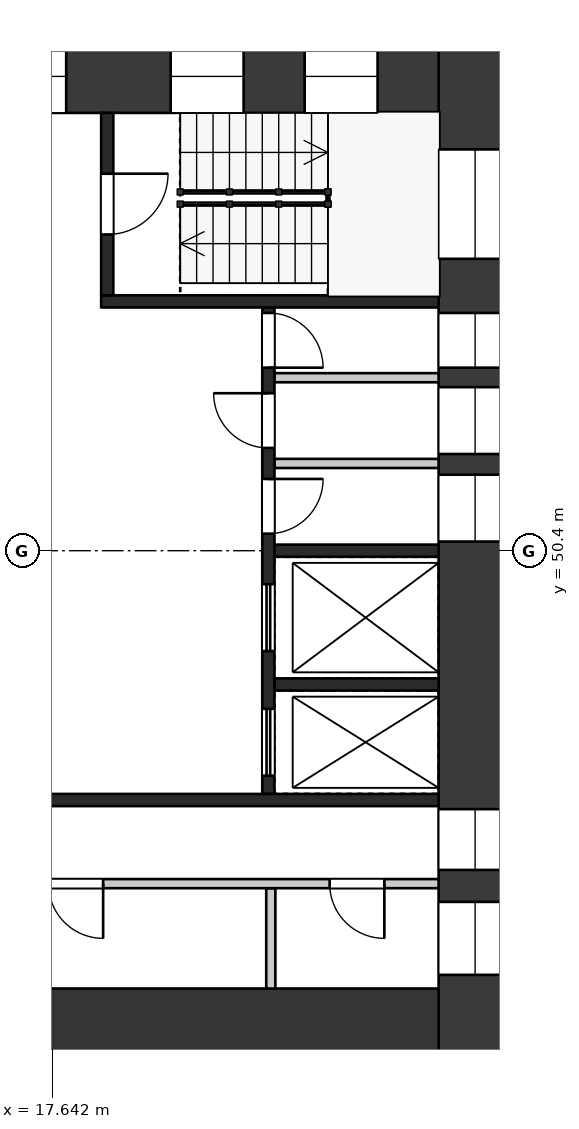
"""IFC4 building model, lengths in metres.
Left out: names, types, materials, properties, quantities, classifications, styles, units other than length and angle.
Written with IfcOpenShell. Run it as: python <this file> out.ifc"""

import sys

from ifc_helpers import new_model, si_unit, direction, frame, frame_2d, origin, place, context, subcontext, project, spatial, rectangle, extrude, element, fill, save


model = new_model("IFC4")
c1 = context("Model", 3, precision=1e-05, world=origin(), true_north=direction((0.0, 1.0)))
c2 = subcontext(c1, "Body", "Model", "MODEL_VIEW")
j1 = project(units=[si_unit("LENGTHUNIT", "METRE"), si_unit("PLANEANGLEUNIT", "RADIAN")], contexts=[c1])
p1 = place(None, origin())
s1 = spatial("IfcSite", under=j1, at=p1, CompositionType="ELEMENT")
p2 = place(p1, origin())
s2 = spatial("IfcBuilding", under=s1, at=p2, CompositionType="ELEMENT")
p3 = place(p2, frame((0.0, 0.0, 214.2)))
s3 = spatial("IfcBuildingStorey", under=s2, at=p3, CompositionType="ELEMENT", Elevation=214.2)
p4 = place(p3, frame((24.6, 58.8, 0.0), z_axis=(0.0, 0.0, 1.0), x_axis=(0.0, -1.0, 0.0)))
e1 = element("IfcWall", 1, at=p4, inside=s3, PredefinedType="SHEAR", context=c2, shape_type="SweptSolid", body=[
    extrude(rectangle(XDim=16.8, YDim=1.2, at=frame_2d((8.4, 0.0))), origin(), (0.0, 0.0, 1.0), 3.22),
])
p5 = place(p4, frame((1.8, 0.0, 0.5)))
e2 = element("IfcOpeningElement", 2, at=p5, cuts=e1, PredefinedType="OPENING", context=c2, shape_type="SweptSolid", body=[
    extrude(rectangle(XDim=1.8, YDim=2.4, at=frame_2d((0.9, 1.2))), frame((0.0, 0.61, 0.0), z_axis=(0.0, -1.0, 0.0), x_axis=(1.0, 0.0, 0.0)), (0.0, 0.0, 1.0), 1.22),
])
p6 = place(p4, frame((4.49, 0.0, 1.6)))
e3 = element("IfcOpeningElement", 3, at=p6, cuts=e1, PredefinedType="OPENING", context=c2, shape_type="SweptSolid", body=[
    extrude(rectangle(XDim=0.9, YDim=1.2, at=frame_2d((0.45, 0.6))), frame((0.0, 0.61, 0.0), z_axis=(0.0, -1.0, 0.0), x_axis=(1.0, 0.0, 0.0)), (0.0, 0.0, 1.0), 1.22),
])
p7 = place(p4, frame((5.71, 0.0, 1.6)))
e4 = element("IfcOpeningElement", 4, at=p7, cuts=e1, PredefinedType="OPENING", context=c2, shape_type="SweptSolid", body=[
    extrude(rectangle(XDim=1.1, YDim=1.2, at=frame_2d((0.55, 0.6))), frame((0.0, 0.61, 0.0), z_axis=(0.0, -1.0, 0.0), x_axis=(1.0, 0.0, 0.0)), (0.0, 0.0, 1.0), 1.22),
])
p8 = place(p4, frame((7.15, 0.0, 1.6)))
e5 = element("IfcOpeningElement", 5, at=p8, cuts=e1, PredefinedType="OPENING", context=c2, shape_type="SweptSolid", body=[
    extrude(rectangle(XDim=1.1, YDim=1.2, at=frame_2d((0.55, 0.6))), frame((0.0, 0.61, 0.0), z_axis=(0.0, -1.0, 0.0), x_axis=(1.0, 0.0, 0.0)), (0.0, 0.0, 1.0), 1.22),
])
p9 = place(p4, frame((12.65, 0.0, 0.6)))
e6 = element("IfcOpeningElement", 6, at=p9, cuts=e1, PredefinedType="OPENING", context=c2, shape_type="SweptSolid", body=[
    extrude(rectangle(XDim=1.0, YDim=2.1, at=frame_2d((0.5, 1.05))), frame((0.0, 0.61, 0.0), z_axis=(0.0, -1.0, 0.0), x_axis=(1.0, 0.0, 0.0)), (0.0, 0.0, 1.0), 1.22),
])
p10 = place(p4, frame((14.175, 0.0, 1.6)))
e7 = element("IfcOpeningElement", 7, at=p10, cuts=e1, PredefinedType="OPENING", context=c2, shape_type="SweptSolid", body=[
    extrude(rectangle(XDim=1.2, YDim=1.2, at=frame_2d((0.6, 0.6))), frame((0.0, 0.61, 0.0), z_axis=(0.0, -1.0, 0.0), x_axis=(1.0, 0.0, 0.0)), (0.0, 0.0, 1.0), 1.22),
])
p11 = place(p3, frame((9.6, 58.2, 0.0), z_axis=(0.0, 0.0, 1.0), x_axis=(1.0, 0.0, 0.0)))
e8 = element("IfcWall", 8, at=p11, inside=s3, PredefinedType="SHEAR", context=c2, shape_type="SweptSolid", body=[
    extrude(rectangle(XDim=14.4, YDim=1.2, at=frame_2d((7.2, 0.0))), origin(), (0.0, 0.0, 1.0), 3.22),
])
p12 = place(p11, frame((1.105, 0.0, 0.6)))
e9 = element("IfcOpeningElement", 9, at=p12, cuts=e8, PredefinedType="OPENING", context=c2, shape_type="SweptSolid", body=[
    extrude(rectangle(XDim=3.0, YDim=2.1, at=frame_2d((1.5, 1.05))), frame((0.0, 0.61, 0.0), z_axis=(0.0, -1.0, 0.0), x_axis=(1.0, 0.0, 0.0)), (0.0, 0.0, 1.0), 1.22),
])
p13 = place(p11, frame((5.875, 0.0, 0.6)))
e10 = element("IfcOpeningElement", 10, at=p13, cuts=e8, PredefinedType="OPENING", context=c2, shape_type="SweptSolid", body=[
    extrude(rectangle(XDim=2.4, YDim=2.1, at=frame_2d((1.2, 1.05))), frame((0.0, 0.61, 0.0), z_axis=(0.0, -1.0, 0.0), x_axis=(1.0, 0.0, 0.0)), (0.0, 0.0, 1.0), 1.22),
])
p14 = place(p11, frame((9.993, 0.0, 0.5)))
e11 = element("IfcOpeningElement", 11, at=p14, cuts=e8, PredefinedType="OPENING", context=c2, shape_type="SweptSolid", body=[
    extrude(rectangle(XDim=1.2, YDim=2.4, at=frame_2d((0.6, 1.2))), frame((0.0, 0.61, 0.0), z_axis=(0.0, -1.0, 0.0), x_axis=(1.0, 0.0, 0.0)), (0.0, 0.0, 1.0), 1.22),
])
p15 = place(p11, frame((12.197, 0.0, 0.5)))
e12 = element("IfcOpeningElement", 12, at=p15, cuts=e8, PredefinedType="OPENING", context=c2, shape_type="SweptSolid", body=[
    extrude(rectangle(XDim=1.2, YDim=2.4, at=frame_2d((0.6, 1.2))), frame((0.0, 0.61, 0.0), z_axis=(0.0, -1.0, 0.0), x_axis=(1.0, 0.0, 0.0)), (0.0, 0.0, 1.0), 1.22),
])
p16 = place(p3, frame((9.6, 42.6, 0.0), z_axis=(0.0, 0.0, 1.0), x_axis=(1.0, 0.0, 0.0)))
e13 = element("IfcWall", 13, at=p16, inside=s3, PredefinedType="SHEAR", context=c2, shape_type="SweptSolid", body=[
    extrude(rectangle(XDim=14.4, YDim=1.2, at=frame_2d((7.2, 0.0))), origin(), (0.0, 0.0, 1.0), 3.22),
])
p17 = place(p16, frame((2.1, 0.0, 0.0)))
e14 = element("IfcOpeningElement", 14, at=p17, cuts=e13, PredefinedType="OPENING", context=c2, shape_type="SweptSolid", body=[
    extrude(rectangle(XDim=1.8, YDim=2.1, at=frame_2d((0.9, 1.05))), frame((0.0, 0.61, 0.0), z_axis=(0.0, -1.0, 0.0), x_axis=(1.0, 0.0, 0.0)), (0.0, 0.0, 1.0), 1.22),
])
for number, where, z_axis, x_axis in (
    (15, (21.3, 50.4, 0.0), (0.0, 0.0, 1.0), (1.0, 0.0, 0.0)),
    (16, (21.3, 48.2, 0.0), (0.0, 0.0, 1.0), (1.0, 0.0, 0.0)),
):
    element("IfcWall", number, at=place(p3, frame(where, z_axis=z_axis, x_axis=x_axis)), inside=s3, PredefinedType="SHEAR", context=c2, shape_type="SweptSolid", body=[
        extrude(rectangle(XDim=2.7, YDim=0.2, at=frame_2d((1.35, 0.0))), origin(), (0.0, 0.0, 1.0), 3.22),
    ])
for number, where, z_axis, x_axis in (
    (17, (21.3, 53.245, 0.0), (0.0, 0.0, 1.0), (1.0, 0.0, 0.0)),
    (18, (21.3, 51.835, 0.0), (0.0, 0.0, 1.0), (1.0, 0.0, 0.0)),
):
    element("IfcWall", number, at=place(p3, frame(where, z_axis=z_axis, x_axis=x_axis)), inside=s3, PredefinedType="PARTITIONING", context=c2, shape_type="SweptSolid", body=[
        extrude(rectangle(XDim=2.7, YDim=0.15, at=frame_2d((1.35, 0.0))), origin(), (0.0, 0.0, 1.0), 3.22),
    ])
p18 = place(p3, frame((21.2, 54.4, 0.0), z_axis=(0.0, 0.0, 1.0), x_axis=(0.0, -1.0, 0.0)))
e19 = element("IfcWall", 19, at=p18, inside=s3, PredefinedType="SHEAR", context=c2, shape_type="SweptSolid", body=[
    extrude(rectangle(XDim=8.0, YDim=0.2, at=frame_2d((4.0, 0.0))), origin(), (0.0, 0.0, 1.0), 3.22),
])
p19 = place(p18, frame((0.09, 0.0, 0.0)))
e20 = element("IfcOpeningElement", 20, at=p19, cuts=e19, PredefinedType="OPENING", context=c2, shape_type="SweptSolid", body=[
    extrude(rectangle(XDim=0.9, YDim=2.1, at=frame_2d((0.45, 1.05))), frame((0.0, 0.11, 0.0), z_axis=(0.0, -1.0, 0.0), x_axis=(1.0, 0.0, 0.0)), (0.0, 0.0, 1.0), 0.22),
])
p20 = place(p18, frame((1.41, 0.0, 0.0)))
e21 = element("IfcOpeningElement", 21, at=p20, cuts=e19, PredefinedType="OPENING", context=c2, shape_type="SweptSolid", body=[
    extrude(rectangle(XDim=0.9, YDim=2.1, at=frame_2d((0.45, 1.05))), frame((0.0, 0.11, 0.0), z_axis=(0.0, -1.0, 0.0), x_axis=(1.0, 0.0, 0.0)), (0.0, 0.0, 1.0), 0.22),
])
p21 = place(p18, frame((2.82, 0.0, 0.0)))
e22 = element("IfcOpeningElement", 22, at=p21, cuts=e19, PredefinedType="OPENING", context=c2, shape_type="SweptSolid", body=[
    extrude(rectangle(XDim=0.9, YDim=2.1, at=frame_2d((0.45, 1.05))), frame((0.0, 0.11, 0.0), z_axis=(0.0, -1.0, 0.0), x_axis=(1.0, 0.0, 0.0)), (0.0, 0.0, 1.0), 0.22),
])
p22 = place(p18, frame((4.55, 0.0, 0.0)))
e23 = element("IfcOpeningElement", 23, at=p22, cuts=e19, PredefinedType="OPENING", context=c2, shape_type="SweptSolid", body=[
    extrude(rectangle(XDim=1.1, YDim=2.1, at=frame_2d((0.55, 1.05))), frame((0.0, 0.11, 0.0), z_axis=(0.0, -1.0, 0.0), x_axis=(1.0, 0.0, 0.0)), (0.0, 0.0, 1.0), 0.22),
])
p23 = place(p18, frame((6.6, 0.0, 0.0)))
e24 = element("IfcOpeningElement", 24, at=p23, cuts=e19, PredefinedType="OPENING", context=c2, shape_type="SweptSolid", body=[
    extrude(rectangle(XDim=1.1, YDim=2.1, at=frame_2d((0.55, 1.05))), frame((0.0, 0.11, 0.0), z_axis=(0.0, -1.0, 0.0), x_axis=(1.0, 0.0, 0.0)), (0.0, 0.0, 1.0), 0.22),
])
p24 = place(p3, frame((18.45, 54.5, 0.0), z_axis=(0.0, 0.0, 1.0), x_axis=(1.0, 0.0, 0.0)))
e25 = element("IfcWall", 25, at=p24, inside=s3, PredefinedType="SHEAR", context=c2, shape_type="SweptSolid", body=[
    extrude(rectangle(XDim=5.55, YDim=0.2, at=frame_2d((2.775, 0.0))), origin(), (0.0, 0.0, 1.0), 3.22),
])
p25 = place(p3, frame((18.55, 57.6, 0.0), z_axis=(0.0, 0.0, 1.0), x_axis=(0.0, -1.0, 0.0)))
e26 = element("IfcWall", 26, at=p25, inside=s3, PredefinedType="SHEAR", context=c2, shape_type="SweptSolid", body=[
    extrude(rectangle(XDim=3.0, YDim=0.2, at=frame_2d((1.5, 0.0))), origin(), (0.0, 0.0, 1.0), 3.22),
])
p26 = place(p25, frame((1.0, 0.0, 0.0)))
e27 = element("IfcOpeningElement", 27, at=p26, cuts=e26, PredefinedType="OPENING", context=c2, shape_type="SweptSolid", body=[
    extrude(rectangle(XDim=1.0, YDim=2.1, at=frame_2d((0.5, 1.05))), frame((0.0, 0.11, 0.0), z_axis=(0.0, -1.0, 0.0), x_axis=(1.0, 0.0, 0.0)), (0.0, 0.0, 1.0), 0.22),
])
p27 = place(p3, frame((14.75, 46.3, 0.0), z_axis=(0.0, 0.0, 1.0), x_axis=(1.0, 0.0, 0.0)))
e28 = element("IfcWall", 28, at=p27, inside=s3, PredefinedType="SHEAR", context=c2, shape_type="SweptSolid", body=[
    extrude(rectangle(XDim=9.25, YDim=0.2, at=frame_2d((4.625, 0.0))), origin(), (0.0, 0.0, 1.0), 3.22),
])
p28 = place(p3, frame((21.24, 44.85, 0.0), z_axis=(0.0, 0.0, 1.0), x_axis=(0.0, -1.0, 0.0)))
e29 = element("IfcWall", 29, at=p28, inside=s3, PredefinedType="PARTITIONING", context=c2, shape_type="SweptSolid", body=[
    extrude(rectangle(XDim=1.65, YDim=0.15, at=frame_2d((0.825, 0.0))), origin(), (0.0, 0.0, 1.0), 3.22),
])
p29 = place(p3, frame((14.9, 44.925, 0.0), z_axis=(0.0, 0.0, 1.0), x_axis=(1.0, 0.0, 0.0)))
e30 = element("IfcWall", 30, at=p29, inside=s3, PredefinedType="PARTITIONING", context=c2, shape_type="SweptSolid", body=[
    extrude(rectangle(XDim=9.1, YDim=0.15, at=frame_2d((4.55, 0.0))), origin(), (0.0, 0.0, 1.0), 3.22),
])
p30 = place(p29, frame((2.683, 0.0, 0.0)))
e31 = element("IfcOpeningElement", 31, at=p30, cuts=e30, PredefinedType="OPENING", context=c2, shape_type="SweptSolid", body=[
    extrude(rectangle(XDim=0.9, YDim=2.1, at=frame_2d((0.45, 1.05))), frame((0.0, 0.085, 0.0), z_axis=(0.0, -1.0, 0.0), x_axis=(1.0, 0.0, 0.0)), (0.0, 0.0, 1.0), 0.17),
])
p31 = place(p29, frame((7.308, 0.0, 0.0)))
e32 = element("IfcOpeningElement", 32, at=p31, cuts=e30, PredefinedType="OPENING", context=c2, shape_type="SweptSolid", body=[
    extrude(rectangle(XDim=0.9, YDim=2.1, at=frame_2d((0.45, 1.05))), frame((0.0, 0.085, 0.0), z_axis=(0.0, -1.0, 0.0), x_axis=(1.0, 0.0, 0.0)), (0.0, 0.0, 1.0), 0.17),
])
p32 = place(p19, origin())
e33 = element("IfcDoor", 33, at=p32, inside=s3, OperationType="SINGLE_SWING_RIGHT", PredefinedType="DOOR", context=c2, shape_type="SweptSolid", body=[
    extrude(rectangle(XDim=0.9, YDim=2.1, at=frame_2d((0.45, 1.05))), frame((0.0, 0.025, 0.0), z_axis=(0.0, -1.0, 0.0), x_axis=(1.0, 0.0, 0.0)), (0.0, 0.0, 1.0), 0.05),
])
fill(e20, e33)
p33 = place(p20, frame((0.9, 0.0, 0.0), z_axis=(0.0, 0.0, 1.0), x_axis=(-1.0, 0.0, 0.0)))
e34 = element("IfcDoor", 34, at=p33, inside=s3, OperationType="SINGLE_SWING_RIGHT", PredefinedType="DOOR", context=c2, shape_type="SweptSolid", body=[
    extrude(rectangle(XDim=0.9, YDim=2.1, at=frame_2d((0.45, 1.05))), frame((0.0, 0.025, 0.0), z_axis=(0.0, -1.0, 0.0), x_axis=(1.0, 0.0, 0.0)), (0.0, 0.0, 1.0), 0.05),
])
fill(e21, e34)
p34 = place(p21, origin())
e35 = element("IfcDoor", 35, at=p34, inside=s3, OperationType="SINGLE_SWING_LEFT", PredefinedType="DOOR", context=c2, shape_type="SweptSolid", body=[
    extrude(rectangle(XDim=0.9, YDim=2.1, at=frame_2d((0.45, 1.05))), frame((0.0, 0.025, 0.0), z_axis=(0.0, -1.0, 0.0), x_axis=(1.0, 0.0, 0.0)), (0.0, 0.0, 1.0), 0.05),
])
fill(e22, e35)
p35 = place(p22, origin())
e36 = element("IfcDoor", 36, at=p35, inside=s3, OperationType="DOUBLE_DOOR_SLIDING", PredefinedType="DOOR", context=c2, shape_type="SweptSolid", body=[
    extrude(rectangle(XDim=1.1, YDim=2.1, at=frame_2d((0.55, 1.05))), frame((0.0, 0.025, 0.0), z_axis=(0.0, -1.0, 0.0), x_axis=(1.0, 0.0, 0.0)), (0.0, 0.0, 1.0), 0.05),
])
fill(e23, e36)
p36 = place(p23, origin())
e37 = element("IfcDoor", 37, at=p36, inside=s3, OperationType="DOUBLE_DOOR_SLIDING", PredefinedType="DOOR", context=c2, shape_type="SweptSolid", body=[
    extrude(rectangle(XDim=1.1, YDim=2.1, at=frame_2d((0.55, 1.05))), frame((0.0, 0.025, 0.0), z_axis=(0.0, -1.0, 0.0), x_axis=(1.0, 0.0, 0.0)), (0.0, 0.0, 1.0), 0.05),
])
fill(e24, e37)
p37 = place(p26, origin())
e38 = element("IfcDoor", 38, at=p37, inside=s3, OperationType="SINGLE_SWING_LEFT", PredefinedType="DOOR", context=c2, shape_type="SweptSolid", body=[
    extrude(rectangle(XDim=1.0, YDim=2.1, at=frame_2d((0.5, 1.05))), frame((0.0, 0.025, 0.0), z_axis=(0.0, -1.0, 0.0), x_axis=(1.0, 0.0, 0.0)), (0.0, 0.0, 1.0), 0.05),
])
fill(e27, e38)
p38 = place(p30, frame((0.9, 0.0, 0.0), z_axis=(0.0, 0.0, 1.0), x_axis=(-1.0, 0.0, 0.0)))
e39 = element("IfcDoor", 39, at=p38, inside=s3, OperationType="SINGLE_SWING_LEFT", PredefinedType="DOOR", context=c2, shape_type="SweptSolid", body=[
    extrude(rectangle(XDim=0.9, YDim=2.1, at=frame_2d((0.45, 1.05))), frame((0.0, 0.025, 0.0), z_axis=(0.0, -1.0, 0.0), x_axis=(1.0, 0.0, 0.0)), (0.0, 0.0, 1.0), 0.05),
])
fill(e31, e39)
p39 = place(p31, frame((0.9, 0.0, 0.0), z_axis=(0.0, 0.0, 1.0), x_axis=(-1.0, 0.0, 0.0)))
e40 = element("IfcDoor", 40, at=p39, inside=s3, OperationType="SINGLE_SWING_LEFT", PredefinedType="DOOR", context=c2, shape_type="SweptSolid", body=[
    extrude(rectangle(XDim=0.9, YDim=2.1, at=frame_2d((0.45, 1.05))), frame((0.0, 0.025, 0.0), z_axis=(0.0, -1.0, 0.0), x_axis=(1.0, 0.0, 0.0)), (0.0, 0.0, 1.0), 0.05),
])
fill(e32, e40)
p40 = place(p5, origin())
e41 = element("IfcWindow", 41, at=p40, inside=s3, PartitioningType="SINGLE_PANEL", PredefinedType="WINDOW", context=c2, shape_type="SweptSolid", body=[
    extrude(rectangle(XDim=1.8, YDim=2.4, at=frame_2d((0.9, 1.2))), frame((0.0, 0.03, 0.0), z_axis=(0.0, -1.0, 0.0), x_axis=(1.0, 0.0, 0.0)), (0.0, 0.0, 1.0), 0.06),
])
fill(e2, e41)
p41 = place(p6, origin())
e42 = element("IfcWindow", 42, at=p41, inside=s3, PartitioningType="SINGLE_PANEL", PredefinedType="WINDOW", context=c2, shape_type="SweptSolid", body=[
    extrude(rectangle(XDim=0.9, YDim=1.2, at=frame_2d((0.45, 0.6))), frame((0.0, 0.03, 0.0), z_axis=(0.0, -1.0, 0.0), x_axis=(1.0, 0.0, 0.0)), (0.0, 0.0, 1.0), 0.06),
])
fill(e3, e42)
p42 = place(p7, origin())
e43 = element("IfcWindow", 43, at=p42, inside=s3, PartitioningType="SINGLE_PANEL", PredefinedType="WINDOW", context=c2, shape_type="SweptSolid", body=[
    extrude(rectangle(XDim=1.1, YDim=1.2, at=frame_2d((0.55, 0.6))), frame((0.0, 0.03, 0.0), z_axis=(0.0, -1.0, 0.0), x_axis=(1.0, 0.0, 0.0)), (0.0, 0.0, 1.0), 0.06),
])
fill(e4, e43)
p43 = place(p8, origin())
e44 = element("IfcWindow", 44, at=p43, inside=s3, PartitioningType="SINGLE_PANEL", PredefinedType="WINDOW", context=c2, shape_type="SweptSolid", body=[
    extrude(rectangle(XDim=1.1, YDim=1.2, at=frame_2d((0.55, 0.6))), frame((0.0, 0.03, 0.0), z_axis=(0.0, -1.0, 0.0), x_axis=(1.0, 0.0, 0.0)), (0.0, 0.0, 1.0), 0.06),
])
fill(e5, e44)
p44 = place(p9, origin())
e45 = element("IfcWindow", 45, at=p44, inside=s3, PartitioningType="SINGLE_PANEL", PredefinedType="WINDOW", context=c2, shape_type="SweptSolid", body=[
    extrude(rectangle(XDim=1.0, YDim=2.1, at=frame_2d((0.5, 1.05))), frame((0.0, 0.03, 0.0), z_axis=(0.0, -1.0, 0.0), x_axis=(1.0, 0.0, 0.0)), (0.0, 0.0, 1.0), 0.06),
])
fill(e6, e45)
p45 = place(p10, origin())
e46 = element("IfcWindow", 46, at=p45, inside=s3, PartitioningType="SINGLE_PANEL", PredefinedType="WINDOW", context=c2, shape_type="SweptSolid", body=[
    extrude(rectangle(XDim=1.2, YDim=1.2, at=frame_2d((0.6, 0.6))), frame((0.0, 0.03, 0.0), z_axis=(0.0, -1.0, 0.0), x_axis=(1.0, 0.0, 0.0)), (0.0, 0.0, 1.0), 0.06),
])
fill(e7, e46)
p46 = place(p13, origin())
e47 = element("IfcWindow", 47, at=p46, inside=s3, PartitioningType="SINGLE_PANEL", PredefinedType="WINDOW", context=c2, shape_type="SweptSolid", body=[
    extrude(rectangle(XDim=2.4, YDim=2.1, at=frame_2d((1.2, 1.05))), frame((0.0, 0.03, 0.0), z_axis=(0.0, -1.0, 0.0), x_axis=(1.0, 0.0, 0.0)), (0.0, 0.0, 1.0), 0.06),
])
fill(e10, e47)
p47 = place(p14, origin())
e48 = element("IfcWindow", 48, at=p47, inside=s3, PartitioningType="SINGLE_PANEL", PredefinedType="WINDOW", context=c2, shape_type="SweptSolid", body=[
    extrude(rectangle(XDim=1.2, YDim=2.4, at=frame_2d((0.6, 1.2))), frame((0.0, 0.03, 0.0), z_axis=(0.0, -1.0, 0.0), x_axis=(1.0, 0.0, 0.0)), (0.0, 0.0, 1.0), 0.06),
])
fill(e11, e48)
p48 = place(p15, origin())
e49 = element("IfcWindow", 49, at=p48, inside=s3, PartitioningType="SINGLE_PANEL", PredefinedType="WINDOW", context=c2, shape_type="SweptSolid", body=[
    extrude(rectangle(XDim=1.2, YDim=2.4, at=frame_2d((0.6, 1.2))), frame((0.0, 0.03, 0.0), z_axis=(0.0, -1.0, 0.0), x_axis=(1.0, 0.0, 0.0)), (0.0, 0.0, 1.0), 0.06),
])
fill(e12, e49)
save(model, sys.argv[1])
